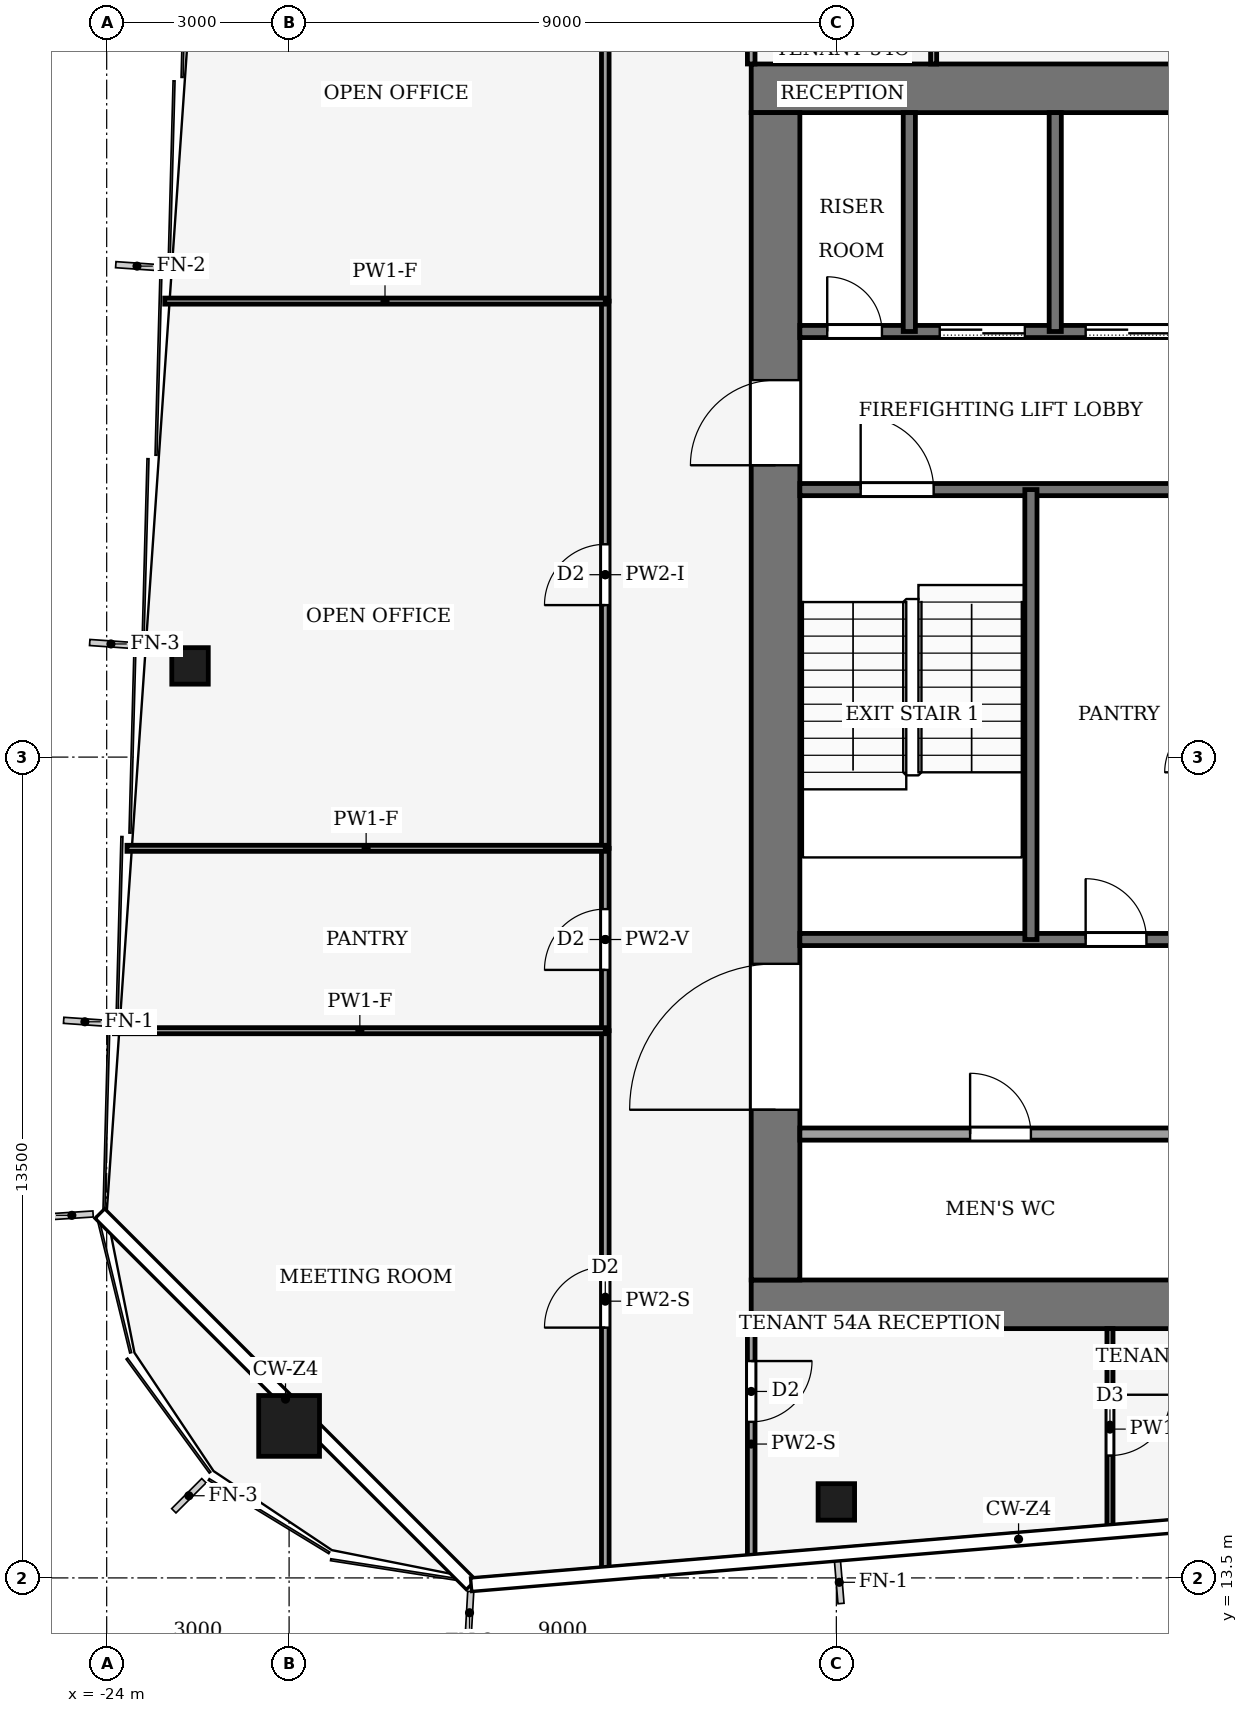
"""IFC4 building model, lengths in metres.
Left out: names, types, materials, properties, quantities, classifications, styles, units other than length and angle.
Written with IfcOpenShell. Run it as: python <this file> out.ifc"""

import sys

from ifc_helpers import new_model, si_unit, direction, frame, frame_2d, origin, origin_2d, place, context, subcontext, project, spatial, rectangle, hollow_rectangle, extrude, element, fill, save


model = new_model("IFC4")
c1 = context("Model", 3, precision=1e-05, world=origin(), true_north=direction((0.0, 1.0)))
c2 = subcontext(c1, "Body", "Model", "MODEL_VIEW")
j1 = project(units=[si_unit("LENGTHUNIT", "METRE"), si_unit("PLANEANGLEUNIT", "RADIAN")], contexts=[c1])
p1 = place(None, origin())
s1 = spatial("IfcSite", under=j1, at=p1, CompositionType="ELEMENT")
p2 = place(p1, origin())
s2 = spatial("IfcBuilding", under=s1, at=p2, CompositionType="ELEMENT")
p3 = place(p2, frame((0.0, 0.0, 238.0)))
s3 = spatial("IfcBuildingStorey", under=s2, at=p3, CompositionType="ELEMENT", Elevation=238.0)
for number, where, z_axis, x_axis in (
    (1, (-13.4, 18.0, -0.13), (0.0, 0.0, 1.0), (1.0, 0.0, 0.0)),
    (2, (-13.4, 38.0, -0.13), (0.0, 0.0, 1.0), (1.0, 0.0, 0.0)),
):
    element("IfcWall", number, at=place(p3, frame(where, z_axis=z_axis, x_axis=x_axis)), inside=s3, PredefinedType="SHEAR", context=c2, shape_type="SweptSolid", body=[
        extrude(rectangle(XDim=26.8, YDim=0.8, at=frame_2d((13.4, 0.0))), origin(), (0.0, 0.0, 1.0), 4.0),
    ])
p4 = place(p3, frame((-13.0, 18.4, -0.13), z_axis=(0.0, 0.0, 1.0), x_axis=(0.0, 1.0, 0.0)))
e3 = element("IfcWall", 3, at=p4, inside=s3, PredefinedType="SHEAR", context=c2, shape_type="SweptSolid", body=[
    extrude(rectangle(XDim=19.2, YDim=0.8, at=frame_2d((9.6, 0.0))), origin(), (0.0, 0.0, 1.0), 4.0),
])
p5 = place(p4, frame((2.8, 0.0, 0.13)))
e4 = element("IfcOpeningElement", 4, at=p5, cuts=e3, PredefinedType="OPENING", context=c2, shape_type="SweptSolid", body=[
    extrude(rectangle(XDim=2.4, YDim=2.4, at=frame_2d((1.2, 1.2))), frame((0.0, 0.41, 0.0), z_axis=(0.0, -1.0, 0.0), x_axis=(1.0, 0.0, 0.0)), (0.0, 0.0, 1.0), 0.82),
])
p6 = place(p4, frame((13.4, 0.0, 0.13)))
e5 = element("IfcOpeningElement", 5, at=p6, cuts=e3, PredefinedType="OPENING", context=c2, shape_type="SweptSolid", body=[
    extrude(rectangle(XDim=1.4, YDim=2.2, at=frame_2d((0.7, 1.1))), frame((0.0, 0.41, 0.0), z_axis=(0.0, -1.0, 0.0), x_axis=(1.0, 0.0, 0.0)), (0.0, 0.0, 1.0), 0.82),
])
p7 = place(p3, frame((-21.0, 16.0, 0.0), z_axis=(0.0, 0.0, 1.0), x_axis=(1.0, 0.0, 0.0)))
e6 = element("IfcColumn", 6, at=p7, inside=s3, PredefinedType="COLUMN", context=c2, shape_type="SweptSolid", body=[
    extrude(hollow_rectangle(XDim=1.0, YDim=1.0, WallThickness=0.045, at=origin_2d()), origin(), (0.0, 0.0, 1.0), 4.0),
])
for number, where, z_axis, x_axis in (
    (7, (-12.0, 14.75, 0.0), (0.0, 0.0, 1.0), (1.0, 0.0, 0.0)),
    (8, (-22.629, 28.5, 0.0), (0.0, 0.0, 1.0), (1.0, 0.0, 0.0)),
):
    element("IfcColumn", number, at=place(p3, frame(where, z_axis=z_axis, x_axis=x_axis)), inside=s3, PredefinedType="COLUMN", context=c2, shape_type="SweptSolid", body=[
        extrude(hollow_rectangle(XDim=0.6, YDim=0.6, WallThickness=0.025, at=origin_2d()), origin(), (0.0, 0.0, 1.0), 4.0),
    ])
p8 = place(p3, frame((-12.6, 20.8, 0.0), z_axis=(0.0, 0.0, 1.0), x_axis=(1.0, 0.0, 0.0)))
e9 = element("IfcWall", 9, at=p8, inside=s3, PredefinedType="PARTITIONING", context=c2, shape_type="SweptSolid", body=[
    extrude(rectangle(XDim=6.6, YDim=0.2, at=frame_2d((3.3, 0.0))), origin(), (0.0, 0.0, 1.0), 3.87),
])
p9 = place(p8, frame((2.8, 0.0, 0.0)))
e10 = element("IfcOpeningElement", 10, at=p9, cuts=e9, PredefinedType="OPENING", context=c2, shape_type="SweptSolid", body=[
    extrude(rectangle(XDim=1.0, YDim=2.1, at=frame_2d((0.5, 1.05))), frame((0.0, 0.11, 0.0), z_axis=(0.0, -1.0, 0.0), x_axis=(1.0, 0.0, 0.0)), (0.0, 0.0, 1.0), 0.22),
])
p10 = place(p3, frame((-12.6, 24.0, 0.0), z_axis=(0.0, 0.0, 1.0), x_axis=(1.0, 0.0, 0.0)))
e11 = element("IfcWall", 11, at=p10, inside=s3, PredefinedType="PARTITIONING", context=c2, shape_type="SweptSolid", body=[
    extrude(rectangle(XDim=6.6, YDim=0.2, at=frame_2d((3.3, 0.0))), origin(), (0.0, 0.0, 1.0), 3.87),
])
p11 = place(p10, frame((4.7, 0.0, 0.0)))
e12 = element("IfcOpeningElement", 12, at=p11, cuts=e11, PredefinedType="OPENING", context=c2, shape_type="SweptSolid", body=[
    extrude(rectangle(XDim=1.0, YDim=2.1, at=frame_2d((0.5, 1.05))), frame((0.0, 0.11, 0.0), z_axis=(0.0, -1.0, 0.0), x_axis=(1.0, 0.0, 0.0)), (0.0, 0.0, 1.0), 0.22),
])
p12 = place(p3, frame((-12.6, 31.4, 0.0), z_axis=(0.0, 0.0, 1.0), x_axis=(1.0, 0.0, 0.0)))
e13 = element("IfcWall", 13, at=p12, inside=s3, PredefinedType="PARTITIONING", context=c2, shape_type="SweptSolid", body=[
    extrude(rectangle(XDim=6.6, YDim=0.2, at=frame_2d((3.3, 0.0))), origin(), (0.0, 0.0, 1.0), 3.87),
])
p13 = place(p12, frame((1.0, 0.0, 0.0)))
e14 = element("IfcOpeningElement", 14, at=p13, cuts=e13, PredefinedType="OPENING", context=c2, shape_type="SweptSolid", body=[
    extrude(rectangle(XDim=1.2, YDim=2.2, at=frame_2d((0.6, 1.1))), frame((0.0, 0.11, 0.0), z_axis=(0.0, -1.0, 0.0), x_axis=(1.0, 0.0, 0.0)), (0.0, 0.0, 1.0), 0.22),
])
p14 = place(p3, frame((-12.6, 34.0, 0.0), z_axis=(0.0, 0.0, 1.0), x_axis=(1.0, 0.0, 0.0)))
e15 = element("IfcWall", 15, at=p14, inside=s3, PredefinedType="PARTITIONING", context=c2, shape_type="SweptSolid", body=[
    extrude(rectangle(XDim=6.6, YDim=0.2, at=frame_2d((3.3, 0.0))), origin(), (0.0, 0.0, 1.0), 3.87),
])
p15 = place(p14, frame((4.7, 0.0, 0.0)))
e16 = element("IfcOpeningElement", 16, at=p15, cuts=e15, PredefinedType="OPENING", context=c2, shape_type="SweptSolid", body=[
    extrude(rectangle(XDim=1.4, YDim=2.2, at=frame_2d((0.7, 1.1))), frame((0.0, 0.11, 0.0), z_axis=(0.0, -1.0, 0.0), x_axis=(1.0, 0.0, 0.0)), (0.0, 0.0, 1.0), 0.22),
])
p16 = place(p14, frame((2.3, 0.0, 0.0)))
e17 = element("IfcOpeningElement", 17, at=p16, cuts=e15, PredefinedType="OPENING", context=c2, shape_type="SweptSolid", body=[
    extrude(rectangle(XDim=1.4, YDim=2.2, at=frame_2d((0.7, 1.1))), frame((0.0, 0.11, 0.0), z_axis=(0.0, -1.0, 0.0), x_axis=(1.0, 0.0, 0.0)), (0.0, 0.0, 1.0), 0.22),
])
p17 = place(p14, frame((0.45, 0.0, 0.0)))
e18 = element("IfcOpeningElement", 18, at=p17, cuts=e15, PredefinedType="OPENING", context=c2, shape_type="SweptSolid", body=[
    extrude(rectangle(XDim=0.9, YDim=2.1, at=frame_2d((0.45, 1.05))), frame((0.0, 0.11, 0.0), z_axis=(0.0, -1.0, 0.0), x_axis=(1.0, 0.0, 0.0)), (0.0, 0.0, 1.0), 0.22),
])
p18 = place(p3, frame((-10.8, 34.0, 0.0), z_axis=(0.0, 0.0, 1.0), x_axis=(0.0, 1.0, 0.0)))
e19 = element("IfcWall", 19, at=p18, inside=s3, PredefinedType="PARTITIONING", context=c2, shape_type="SweptSolid", body=[
    extrude(rectangle(XDim=3.6, YDim=0.2, at=frame_2d((1.8, 0.0))), origin(), (0.0, 0.0, 1.0), 3.87),
])
p19 = place(p3, frame((-8.8, 24.0, 0.0), z_axis=(0.0, 0.0, 1.0), x_axis=(0.0, 1.0, 0.0)))
e20 = element("IfcWall", 20, at=p19, inside=s3, PredefinedType="PARTITIONING", context=c2, shape_type="SweptSolid", body=[
    extrude(rectangle(XDim=7.4, YDim=0.2, at=frame_2d((3.7, 0.0))), origin(), (0.0, 0.0, 1.0), 3.87),
])
p20 = place(p3, frame((-8.4, 34.0, 0.0), z_axis=(0.0, 0.0, 1.0), x_axis=(0.0, 1.0, 0.0)))
e21 = element("IfcWall", 21, at=p20, inside=s3, PredefinedType="PARTITIONING", context=c2, shape_type="SweptSolid", body=[
    extrude(rectangle(XDim=3.6, YDim=0.2, at=frame_2d((1.8, 0.0))), origin(), (0.0, 0.0, 1.0), 3.87),
])
p21 = place(p3, frame((-15.8, 13.603, 0.0), z_axis=(0.0, 0.0, 1.0), x_axis=(0.0, 1.0, 0.0)))
e22 = element("IfcWall", 22, at=p21, inside=s3, PredefinedType="PARTITIONING", context=c2, shape_type="SweptSolid", body=[
    extrude(rectangle(XDim=8.897, YDim=0.125, at=frame_2d((4.448, 0.0))), origin(), (0.0, 0.0, 1.0), 3.04),
])
p22 = place(p21, frame((4.013, 0.0, 0.0)))
e23 = element("IfcOpeningElement", 23, at=p22, cuts=e22, PredefinedType="OPENING", context=c2, shape_type="SweptSolid", body=[
    extrude(rectangle(XDim=1.0, YDim=2.1, at=frame_2d((0.5, 1.05))), frame((0.0, 0.073, 0.0), z_axis=(0.0, -1.0, 0.0), x_axis=(1.0, 0.0, 0.0)), (0.0, 0.0, 1.0), 0.145),
])
p23 = place(p3, frame((-15.8, 22.5, 0.0), z_axis=(0.0, 0.0, 1.0), x_axis=(0.0, 1.0, 0.0)))
e24 = element("IfcWall", 24, at=p23, inside=s3, PredefinedType="PARTITIONING", context=c2, shape_type="SweptSolid", body=[
    extrude(rectangle(XDim=3.0, YDim=0.125, at=frame_2d((1.5, 0.0))), origin(), (0.0, 0.0, 1.0), 3.44),
])
p24 = place(p23, frame((1.0, 0.0, 0.0)))
e25 = element("IfcOpeningElement", 25, at=p24, cuts=e24, PredefinedType="OPENING", context=c2, shape_type="SweptSolid", body=[
    extrude(rectangle(XDim=1.0, YDim=2.1, at=frame_2d((0.5, 1.05))), frame((0.0, 0.073, 0.0), z_axis=(0.0, -1.0, 0.0), x_axis=(1.0, 0.0, 0.0)), (0.0, 0.0, 1.0), 0.145),
])
p25 = place(p3, frame((-15.8, 25.5, 0.0), z_axis=(0.0, 0.0, 1.0), x_axis=(0.0, 1.0, 0.0)))
e26 = element("IfcWall", 26, at=p25, inside=s3, PredefinedType="PARTITIONING", context=c2, shape_type="SweptSolid", body=[
    extrude(rectangle(XDim=9.0, YDim=0.125, at=frame_2d((4.5, 0.0))), origin(), (0.0, 0.0, 1.0), 3.48),
])
p26 = place(p25, frame((4.0, 0.0, 0.0)))
e27 = element("IfcOpeningElement", 27, at=p26, cuts=e26, PredefinedType="OPENING", context=c2, shape_type="SweptSolid", body=[
    extrude(rectangle(XDim=1.0, YDim=2.1, at=frame_2d((0.5, 1.05))), frame((0.0, 0.073, 0.0), z_axis=(0.0, -1.0, 0.0), x_axis=(1.0, 0.0, 0.0)), (0.0, 0.0, 1.0), 0.145),
])
p27 = place(p3, frame((-15.8, 34.5, 0.0), z_axis=(0.0, 0.0, 1.0), x_axis=(0.0, 1.0, 0.0)))
e28 = element("IfcWall", 28, at=p27, inside=s3, PredefinedType="PARTITIONING", context=c2, shape_type="SweptSolid", body=[
    extrude(rectangle(XDim=12.0, YDim=0.125, at=frame_2d((6.0, 0.0))), origin(), (0.0, 0.0, 1.0), 3.14),
])
p28 = place(p27, frame((5.5, 0.0, 0.0)))
e29 = element("IfcOpeningElement", 29, at=p28, cuts=e28, PredefinedType="OPENING", context=c2, shape_type="SweptSolid", body=[
    extrude(rectangle(XDim=1.0, YDim=2.1, at=frame_2d((0.5, 1.05))), frame((0.0, 0.073, 0.0), z_axis=(0.0, -1.0, 0.0), x_axis=(1.0, 0.0, 0.0)), (0.0, 0.0, 1.0), 0.145),
])
p29 = place(p3, frame((-13.4, 17.6, 0.0), z_axis=(0.0, 0.0, 1.0), x_axis=(0.0, -1.0, 0.0)))
e30 = element("IfcWall", 30, at=p29, inside=s3, PredefinedType="PARTITIONING", context=c2, shape_type="SweptSolid", body=[
    extrude(rectangle(XDim=3.797, YDim=0.125, at=frame_2d((1.898, 0.0))), origin(), (0.0, 0.0, 1.0), 3.04),
])
p30 = place(p29, frame((0.533, 0.0, 0.0)))
e31 = element("IfcOpeningElement", 31, at=p30, cuts=e30, PredefinedType="OPENING", context=c2, shape_type="SweptSolid", body=[
    extrude(rectangle(XDim=1.0, YDim=2.1, at=frame_2d((0.5, 1.05))), frame((0.0, 0.073, 0.0), z_axis=(0.0, -1.0, 0.0), x_axis=(1.0, 0.0, 0.0)), (0.0, 0.0, 1.0), 0.145),
])
p31 = place(p3, frame((-13.4, 40.5, 0.0), z_axis=(0.0, 0.0, 1.0), x_axis=(0.0, -1.0, 0.0)))
e32 = element("IfcWall", 32, at=p31, inside=s3, PredefinedType="PARTITIONING", context=c2, shape_type="SweptSolid", body=[
    extrude(rectangle(XDim=2.1, YDim=0.125, at=frame_2d((1.05, 0.0))), origin(), (0.0, 0.0, 1.0), 3.14),
])
p32 = place(p31, frame((0.55, 0.0, 0.0)))
e33 = element("IfcOpeningElement", 33, at=p32, cuts=e32, PredefinedType="OPENING", context=c2, shape_type="SweptSolid", body=[
    extrude(rectangle(XDim=1.0, YDim=2.1, at=frame_2d((0.5, 1.05))), frame((0.0, 0.073, 0.0), z_axis=(0.0, -1.0, 0.0), x_axis=(1.0, 0.0, 0.0)), (0.0, 0.0, 1.0), 0.145),
])
p33 = place(p3, frame((-15.8, 22.5, 0.0), z_axis=(0.0, 0.0, 1.0), x_axis=(-1.0, 0.0, 0.0)))
e34 = element("IfcWall", 34, at=p33, inside=s3, PredefinedType="PARTITIONING", context=c2, shape_type="SweptSolid", body=[
    extrude(rectangle(XDim=8.073, YDim=0.1, at=frame_2d((4.037, 0.0))), origin(), (0.0, 0.0, 1.0), 3.04),
])
p34 = place(p3, frame((-15.8, 25.5, 0.0), z_axis=(0.0, 0.0, 1.0), x_axis=(-1.0, 0.0, 0.0)))
e35 = element("IfcWall", 35, at=p34, inside=s3, PredefinedType="PARTITIONING", context=c2, shape_type="SweptSolid", body=[
    extrude(rectangle(XDim=7.866, YDim=0.1, at=frame_2d((3.933, 0.0))), origin(), (0.0, 0.0, 1.0), 3.04),
])
p35 = place(p3, frame((-15.8, 34.5, 0.0), z_axis=(0.0, 0.0, 1.0), x_axis=(-1.0, 0.0, 0.0)))
e36 = element("IfcWall", 36, at=p35, inside=s3, PredefinedType="PARTITIONING", context=c2, shape_type="SweptSolid", body=[
    extrude(rectangle(XDim=7.245, YDim=0.1, at=frame_2d((3.623, 0.0))), origin(), (0.0, 0.0, 1.0), 3.04),
])
p36 = place(p3, frame((-7.5, 17.6, 0.0), z_axis=(0.0, 0.0, 1.0), x_axis=(0.0, -1.0, 0.0)))
e37 = element("IfcWall", 37, at=p36, inside=s3, PredefinedType="PARTITIONING", context=c2, shape_type="SweptSolid", body=[
    extrude(rectangle(XDim=3.305, YDim=0.1, at=frame_2d((1.653, 0.0))), origin(), (0.0, 0.0, 1.0), 3.04),
])
p37 = place(p36, frame((1.087, 0.0, 0.0)))
e38 = element("IfcOpeningElement", 38, at=p37, cuts=e37, PredefinedType="OPENING", context=c2, shape_type="SweptSolid", body=[
    extrude(rectangle(XDim=1.0, YDim=2.1, at=frame_2d((0.5, 1.05))), frame((0.0, 0.06, 0.0), z_axis=(0.0, -1.0, 0.0), x_axis=(1.0, 0.0, 0.0)), (0.0, 0.0, 1.0), 0.12),
])
p38 = place(p3, frame((-10.4, 38.4, 0.0), z_axis=(0.0, 0.0, 1.0), x_axis=(0.0, 1.0, 0.0)))
e39 = element("IfcWall", 39, at=p38, inside=s3, PredefinedType="PARTITIONING", context=c2, shape_type="SweptSolid", body=[
    extrude(rectangle(XDim=2.1, YDim=0.1, at=frame_2d((1.05, 0.0))), origin(), (0.0, 0.0, 1.0), 3.87),
])
p39 = place(p15, origin())
e40 = element("IfcDoor", 40, at=p39, inside=s3, OperationType="SLIDING_TO_LEFT", PredefinedType="DOOR", context=c2, shape_type="SweptSolid", body=[
    extrude(rectangle(XDim=1.4, YDim=2.2, at=frame_2d((0.7, 1.1))), frame((0.0, 0.025, 0.0), z_axis=(0.0, -1.0, 0.0), x_axis=(1.0, 0.0, 0.0)), (0.0, 0.0, 1.0), 0.05),
])
fill(e16, e40)
p40 = place(p16, origin())
e41 = element("IfcDoor", 41, at=p40, inside=s3, OperationType="SLIDING_TO_LEFT", PredefinedType="DOOR", context=c2, shape_type="SweptSolid", body=[
    extrude(rectangle(XDim=1.4, YDim=2.2, at=frame_2d((0.7, 1.1))), frame((0.0, 0.025, 0.0), z_axis=(0.0, -1.0, 0.0), x_axis=(1.0, 0.0, 0.0)), (0.0, 0.0, 1.0), 0.05),
])
fill(e17, e41)
p41 = place(p17, origin())
e42 = element("IfcDoor", 42, at=p41, inside=s3, OperationType="SINGLE_SWING_RIGHT", PredefinedType="DOOR", context=c2, shape_type="SweptSolid", body=[
    extrude(rectangle(XDim=0.9, YDim=2.1, at=frame_2d((0.45, 1.05))), frame((0.0, 0.025, 0.0), z_axis=(0.0, -1.0, 0.0), x_axis=(1.0, 0.0, 0.0)), (0.0, 0.0, 1.0), 0.05),
])
fill(e18, e42)
p42 = place(p9, origin())
e43 = element("IfcDoor", 43, at=p42, inside=s3, OperationType="SINGLE_SWING_LEFT", PredefinedType="DOOR", context=c2, shape_type="SweptSolid", body=[
    extrude(rectangle(XDim=1.0, YDim=2.1, at=frame_2d((0.5, 1.05))), frame((0.0, 0.025, 0.0), z_axis=(0.0, -1.0, 0.0), x_axis=(1.0, 0.0, 0.0)), (0.0, 0.0, 1.0), 0.05),
])
fill(e10, e43)
p43 = place(p11, origin())
e44 = element("IfcDoor", 44, at=p43, inside=s3, OperationType="SINGLE_SWING_RIGHT", PredefinedType="DOOR", context=c2, shape_type="SweptSolid", body=[
    extrude(rectangle(XDim=1.0, YDim=2.1, at=frame_2d((0.5, 1.05))), frame((0.0, 0.025, 0.0), z_axis=(0.0, -1.0, 0.0), x_axis=(1.0, 0.0, 0.0)), (0.0, 0.0, 1.0), 0.05),
])
fill(e12, e44)
p44 = place(p13, origin())
e45 = element("IfcDoor", 45, at=p44, inside=s3, OperationType="SINGLE_SWING_RIGHT", PredefinedType="DOOR", context=c2, shape_type="SweptSolid", body=[
    extrude(rectangle(XDim=1.2, YDim=2.2, at=frame_2d((0.6, 1.1))), frame((0.0, 0.025, 0.0), z_axis=(0.0, -1.0, 0.0), x_axis=(1.0, 0.0, 0.0)), (0.0, 0.0, 1.0), 0.05),
])
fill(e14, e45)
p45 = place(p5, origin())
e46 = element("IfcDoor", 46, at=p45, inside=s3, OperationType="DOUBLE_DOOR_SINGLE_SWING", PredefinedType="DOOR", context=c2, shape_type="SweptSolid", body=[
    extrude(rectangle(XDim=2.4, YDim=2.4, at=frame_2d((1.2, 1.2))), frame((0.0, 0.025, 0.0), z_axis=(0.0, -1.0, 0.0), x_axis=(1.0, 0.0, 0.0)), (0.0, 0.0, 1.0), 0.05),
])
fill(e4, e46)
p46 = place(p6, origin())
e47 = element("IfcDoor", 47, at=p46, inside=s3, OperationType="SINGLE_SWING_RIGHT", PredefinedType="DOOR", context=c2, shape_type="SweptSolid", body=[
    extrude(rectangle(XDim=1.4, YDim=2.2, at=frame_2d((0.7, 1.1))), frame((0.0, 0.025, 0.0), z_axis=(0.0, -1.0, 0.0), x_axis=(1.0, 0.0, 0.0)), (0.0, 0.0, 1.0), 0.05),
])
fill(e5, e47)
p47 = place(p22, origin())
e48 = element("IfcDoor", 48, at=p47, inside=s3, OperationType="SINGLE_SWING_RIGHT", PredefinedType="DOOR", context=c2, shape_type="SweptSolid", body=[
    extrude(rectangle(XDim=1.0, YDim=2.1, at=frame_2d((0.5, 1.05))), frame((0.0, 0.025, 0.0), z_axis=(0.0, -1.0, 0.0), x_axis=(1.0, 0.0, 0.0)), (0.0, 0.0, 1.0), 0.05),
])
fill(e23, e48)
p48 = place(p24, origin())
e49 = element("IfcDoor", 49, at=p48, inside=s3, OperationType="SINGLE_SWING_RIGHT", PredefinedType="DOOR", context=c2, shape_type="SweptSolid", body=[
    extrude(rectangle(XDim=1.0, YDim=2.1, at=frame_2d((0.5, 1.05))), frame((0.0, 0.025, 0.0), z_axis=(0.0, -1.0, 0.0), x_axis=(1.0, 0.0, 0.0)), (0.0, 0.0, 1.0), 0.05),
])
fill(e25, e49)
p49 = place(p26, origin())
e50 = element("IfcDoor", 50, at=p49, inside=s3, OperationType="SINGLE_SWING_LEFT", PredefinedType="DOOR", context=c2, shape_type="SweptSolid", body=[
    extrude(rectangle(XDim=1.0, YDim=2.1, at=frame_2d((0.5, 1.05))), frame((0.0, 0.025, 0.0), z_axis=(0.0, -1.0, 0.0), x_axis=(1.0, 0.0, 0.0)), (0.0, 0.0, 1.0), 0.05),
])
fill(e27, e50)
p50 = place(p30, origin())
e51 = element("IfcDoor", 51, at=p50, inside=s3, OperationType="SINGLE_SWING_LEFT", PredefinedType="DOOR", context=c2, shape_type="SweptSolid", body=[
    extrude(rectangle(XDim=1.0, YDim=2.1, at=frame_2d((0.5, 1.05))), frame((0.0, 0.025, 0.0), z_axis=(0.0, -1.0, 0.0), x_axis=(1.0, 0.0, 0.0)), (0.0, 0.0, 1.0), 0.05),
])
fill(e31, e51)
p51 = place(p37, origin())
e52 = element("IfcDoor", 52, at=p51, inside=s3, OperationType="SINGLE_SWING_LEFT", PredefinedType="DOOR", context=c2, shape_type="SweptSolid", body=[
    extrude(rectangle(XDim=1.0, YDim=2.1, at=frame_2d((0.5, 1.05))), frame((0.0, 0.025, 0.0), z_axis=(0.0, -1.0, 0.0), x_axis=(1.0, 0.0, 0.0)), (0.0, 0.0, 1.0), 0.05),
])
fill(e38, e52)
save(model, sys.argv[1])
